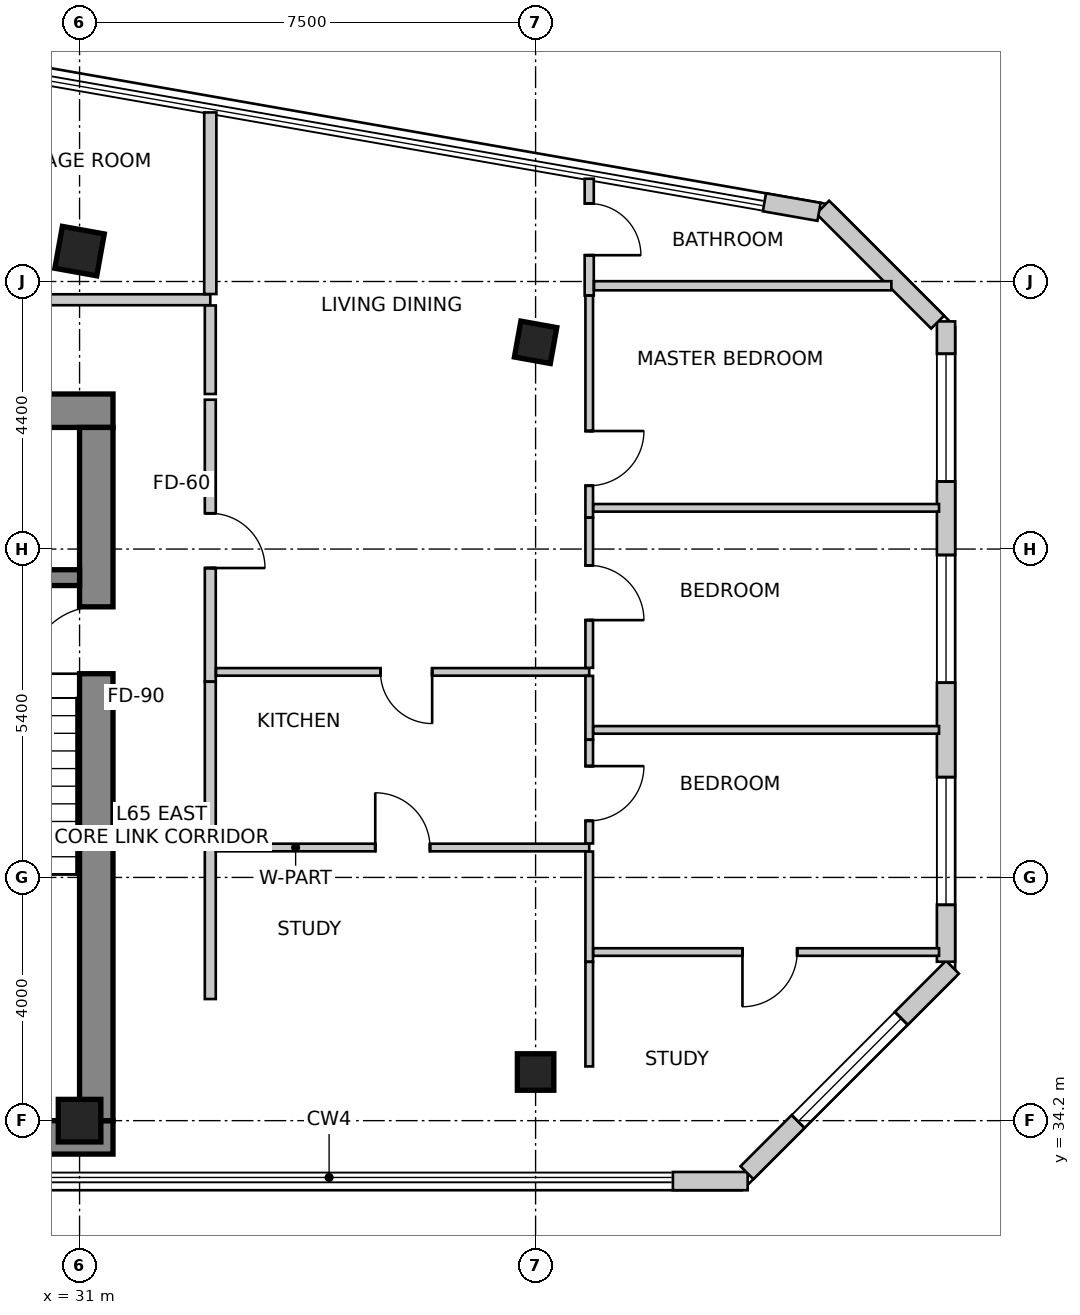
"""IFC4 building model, lengths in metres.
Left out: names, types, materials, properties, quantities, classifications, styles, units other than length and angle.
Written with IfcOpenShell. Run it as: python <this file> out.ifc"""

import sys

from ifc_helpers import new_model, si_unit, direction, frame, frame_2d, origin, origin_2d, place, context, subcontext, project, spatial, rectangle, extrude, source, transform, mapped, element, fill, save


model = new_model("IFC4")
c1 = context("Model", 3, precision=1e-05, world=origin(), true_north=direction((0.0, 1.0)))
c2 = subcontext(c1, "Body", "Model", "MODEL_VIEW")
j1 = project(units=[si_unit("LENGTHUNIT", "METRE"), si_unit("PLANEANGLEUNIT", "RADIAN")], contexts=[c1])
p1 = place(None, origin())
s1 = spatial("IfcSite", under=j1, at=p1, CompositionType="ELEMENT")
p2 = place(p1, origin())
s2 = spatial("IfcBuilding", under=s1, at=p2, CompositionType="ELEMENT")
p3 = place(p2, frame((0.0, 0.0, 256.5)))
s3 = spatial("IfcBuildingStorey", under=s2, at=p3, CompositionType="ELEMENT", Elevation=256.5)
p4 = place(p3, frame((16.05, 45.875, 0.0), z_axis=(0.0, 0.0, 1.0), x_axis=(1.0, 0.0, 0.0)))
e1 = element("IfcWall", 1, at=p4, inside=s3, PredefinedType="SHEAR", context=c2, shape_type="SweptSolid", body=[
    extrude(rectangle(XDim=15.5, YDim=0.55, at=frame_2d((7.75, 0.0))), origin(), (0.0, 0.0, 1.0), 3.6),
])
p5 = place(p3, frame((16.05, 33.925, 0.0), z_axis=(0.0, 0.0, 1.0), x_axis=(1.0, 0.0, 0.0)))
e2 = element("IfcWall", 2, at=p5, inside=s3, PredefinedType="SHEAR", context=c2, shape_type="SweptSolid", body=[
    extrude(rectangle(XDim=15.5, YDim=0.55, at=frame_2d((7.75, 0.0))), origin(), (0.0, 0.0, 1.0), 3.6),
])
m1 = source(origin(), c2, "Body", "SweptSolid", [
    extrude(rectangle(XDim=1.1, YDim=2.15, at=frame_2d((0.55, 1.075))), frame((0.0, 0.285, 0.0), z_axis=(0.0, -1.0, 0.0), x_axis=(1.0, 0.0, 0.0)), (0.0, 0.0, 1.0), 0.57),
])
p6 = place(p5, frame((9.98, 0.0, 0.0)))
e3 = element("IfcOpeningElement", 3, at=p6, cuts=e2, PredefinedType="OPENING", context=c2, shape_type="MappedRepresentation", body=[
    mapped(m1, transform((0.0, 0.0, 0.0), scale=1.0)),
])
p7 = place(p3, frame((31.275, 34.2, 0.0), z_axis=(0.0, 0.0, 1.0), x_axis=(0.0, 1.0, 0.0)))
e4 = element("IfcWall", 4, at=p7, inside=s3, PredefinedType="SHEAR", context=c2, shape_type="SweptSolid", body=[
    extrude(rectangle(XDim=11.4, YDim=0.55, at=frame_2d((5.7, 0.0))), origin(), (0.0, 0.0, 1.0), 3.6),
])
p8 = place(p7, frame((7.35, 0.0, 0.0)))
e5 = element("IfcOpeningElement", 5, at=p8, cuts=e4, PredefinedType="OPENING", context=c2, shape_type="MappedRepresentation", body=[
    mapped(m1, transform((0.0, 0.0, 0.0), scale=1.0)),
])
p9 = place(p3, frame((27.5, 43.13, 0.0), z_axis=(0.0, 0.0, 1.0), x_axis=(1.0, 0.0, 0.0)))
e6 = element("IfcWall", 6, at=p9, inside=s3, PredefinedType="SHEAR", context=c2, shape_type="SweptSolid", body=[
    extrude(rectangle(XDim=3.5, YDim=0.26, at=frame_2d((1.75, 0.0))), origin(), (0.0, 0.0, 1.0), 3.6),
])
m2 = source(origin(), c2, "Body", "SweptSolid", [
    extrude(rectangle(XDim=0.7, YDim=0.7, at=origin_2d()), origin(), (0.0, 0.0, 1.0), 3.6),
])
p10 = place(p3, frame((31.0, 48.5, 0.0), z_axis=(0.0, 0.0, 1.0), x_axis=(0.984195607969, -0.17708474032, 0.0)))
e7 = element("IfcColumn", 7, at=p10, inside=s3, PredefinedType="COLUMN", context=c2, shape_type="MappedRepresentation", body=[
    mapped(m2, transform((0.0, 0.0, 0.0), scale=1.0)),
])
m3 = source(origin(), c2, "Body", "SweptSolid", [
    extrude(rectangle(XDim=0.6, YDim=0.6, at=origin_2d()), origin(), (0.0, 0.0, 1.0), 3.6),
])
p11 = place(p3, frame((38.5, 47.0, 0.0), z_axis=(0.0, 0.0, 1.0), x_axis=(0.984195607969, -0.17708474032, 0.0)))
e8 = element("IfcColumn", 8, at=p11, inside=s3, PredefinedType="COLUMN", context=c2, shape_type="MappedRepresentation", body=[
    mapped(m3, transform((0.0, 0.0, 0.0), scale=1.0)),
])
p12 = place(p3, frame((31.0, 34.2, 0.0), z_axis=(0.0, 0.0, 1.0), x_axis=(1.0, 0.0, 0.0)))
e9 = element("IfcColumn", 9, at=p12, inside=s3, PredefinedType="COLUMN", context=c2, shape_type="MappedRepresentation", body=[
    mapped(m2, transform((0.0, 0.0, 0.0), scale=1.0)),
])
p13 = place(p3, frame((38.5, 35.0, 0.0), z_axis=(0.0, 0.0, 1.0), x_axis=(1.0, 0.0, 0.0)))
e10 = element("IfcColumn", 10, at=p13, inside=s3, PredefinedType="COLUMN", context=c2, shape_type="MappedRepresentation", body=[
    mapped(m3, transform((0.0, 0.0, 0.0), scale=1.0)),
])
p14 = place(p3, frame((40.758, 33.206, 0.0), z_axis=(0.0, 0.0, 1.0), x_axis=(1.0, 0.0, 0.0)))
e11 = element("IfcWall", 11, at=p14, inside=s3, PredefinedType="SOLIDWALL", context=c2, shape_type="SweptSolid", body=[
    extrude(rectangle(XDim=1.23, YDim=0.3, at=frame_2d((0.615, 0.0))), origin(), (0.0, 0.0, 1.0), 3.35),
])
p15 = place(p3, frame((41.976, 33.344, 0.0), z_axis=(0.0, 0.0, 1.0), x_axis=(0.707132316343, 0.707081245108, 0.0)))
e12 = element("IfcWall", 12, at=p15, inside=s3, PredefinedType="SOLIDWALL", context=c2, shape_type="SweptSolid", body=[
    extrude(rectangle(XDim=4.78, YDim=0.3, at=frame_2d((2.39, 0.0))), origin(), (0.0, 0.0, 1.0), 3.35),
])
m4 = source(origin(), c2, "Body", "SweptSolid", [
    extrude(rectangle(XDim=2.4, YDim=2.2, at=frame_2d((1.2, 1.1))), frame((0.0, 0.16, 0.0), z_axis=(0.0, -1.0, 0.0), x_axis=(1.0, 0.0, 0.0)), (0.0, 0.0, 1.0), 0.32),
])
p16 = place(p15, frame((1.19, 0.0, 0.85)))
e13 = element("IfcOpeningElement", 13, at=p16, cuts=e12, PredefinedType="OPENING", context=c2, shape_type="MappedRepresentation", body=[
    mapped(m4, transform((0.0, 0.0, 0.0), scale=1.0)),
])
p17 = place(p3, frame((45.25, 36.813, 0.0), z_axis=(0.0, 0.0, 1.0), x_axis=(0.0, 1.0, 0.0)))
e14 = element("IfcWall", 14, at=p17, inside=s3, PredefinedType="SOLIDWALL", context=c2, shape_type="SweptSolid", body=[
    extrude(rectangle(XDim=10.531, YDim=0.3, at=frame_2d((5.265, 0.0))), origin(), (0.0, 0.0, 1.0), 3.35),
])
m5 = source(origin(), c2, "Body", "SweptSolid", [
    extrude(rectangle(XDim=2.1, YDim=2.0, at=frame_2d((1.05, 1.0))), frame((0.0, 0.16, 0.0), z_axis=(0.0, -1.0, 0.0), x_axis=(1.0, 0.0, 0.0)), (0.0, 0.0, 1.0), 0.32),
])
p18 = place(p17, frame((0.936, 0.0, 0.85)))
e15 = element("IfcOpeningElement", 15, at=p18, cuts=e14, PredefinedType="OPENING", context=c2, shape_type="MappedRepresentation", body=[
    mapped(m5, transform((0.0, 0.0, 0.0), scale=1.0)),
])
p19 = place(p17, frame((4.589, 0.0, 0.85)))
e16 = element("IfcOpeningElement", 16, at=p19, cuts=e14, PredefinedType="OPENING", context=c2, shape_type="MappedRepresentation", body=[
    mapped(m5, transform((0.0, 0.0, 0.0), scale=1.0)),
])
p20 = place(p17, frame((7.898, 0.0, 0.85)))
e17 = element("IfcOpeningElement", 17, at=p20, cuts=e14, PredefinedType="OPENING", context=c2, shape_type="MappedRepresentation", body=[
    mapped(m5, transform((0.0, 0.0, 0.0), scale=1.0)),
])
p21 = place(p3, frame((45.112, 47.332, 0.0), z_axis=(0.0, 0.0, 1.0), x_axis=(-0.707106781187, 0.707106781187, 0.0)))
e18 = element("IfcWall", 18, at=p21, inside=s3, PredefinedType="SOLIDWALL", context=c2, shape_type="SweptSolid", body=[
    extrude(rectangle(XDim=2.674, YDim=0.3, at=frame_2d((1.337, 0.0))), origin(), (0.0, 0.0, 1.0), 3.35),
])
p22 = place(p3, frame((43.161, 49.146, 0.0), z_axis=(0.0, 0.0, 1.0), x_axis=(-0.985052066521, 0.172256861238, 0.0)))
e19 = element("IfcWall", 19, at=p22, inside=s3, PredefinedType="SOLIDWALL", context=c2, shape_type="SweptSolid", body=[
    extrude(rectangle(XDim=0.911, YDim=0.3, at=frame_2d((0.456, 0.0))), origin(), (0.0, 0.0, 1.0), 3.35),
])
p23 = place(p3, frame((28.362, 47.7, 0.0), z_axis=(0.0, 0.0, 1.0), x_axis=(1.0, 0.0, 0.0)))
e20 = element("IfcWall", 20, at=p23, inside=s3, PredefinedType="PARTITIONING", context=c2, shape_type="SweptSolid", body=[
    extrude(rectangle(XDim=4.788, YDim=0.18, at=frame_2d((2.394, 0.0))), origin(), (0.0, 0.0, 1.0), 2.922),
])
m6 = source(origin(), c2, "Body", "SweptSolid", [
    extrude(rectangle(XDim=0.85, YDim=2.15, at=frame_2d((0.425, 1.075))), frame((0.0, 0.1, 0.0), z_axis=(0.0, -1.0, 0.0), x_axis=(1.0, 0.0, 0.0)), (0.0, 0.0, 1.0), 0.2),
])
p24 = place(p23, frame((0.401, 0.0, 0.0)))
e21 = element("IfcOpeningElement", 21, at=p24, cuts=e20, PredefinedType="OPENING", context=c2, shape_type="MappedRepresentation", body=[
    mapped(m6, transform((0.0, 0.0, 0.0), scale=1.0)),
])
p25 = place(p3, frame((33.15, 47.606, 0.0), z_axis=(0.0, 0.0, 1.0), x_axis=(0.0, -1.0, 0.0)))
e22 = element("IfcWall", 22, at=p25, inside=s3, PredefinedType="PARTITIONING", context=c2, shape_type="SweptSolid", body=[
    extrude(rectangle(XDim=1.456, YDim=0.18, at=frame_2d((0.728, 0.0))), origin(), (0.0, 0.0, 1.0), 3.35),
])
p26 = place(p3, frame((33.15, 38.852, 0.0), z_axis=(0.0, 0.0, 1.0), x_axis=(0.0, -1.0, 0.0)))
e23 = element("IfcWall", 23, at=p26, inside=s3, PredefinedType="PARTITIONING", context=c2, shape_type="SweptSolid", body=[
    extrude(rectangle(XDim=2.652, YDim=0.18, at=frame_2d((1.326, 0.0))), origin(), (0.0, 0.0, 1.0), 3.35),
])
p27 = place(p3, frame((33.15, 46.056, 0.0), z_axis=(0.0, 0.0, 1.0), x_axis=(0.0, -1.0, 0.0)))
e24 = element("IfcWall", 24, at=p27, inside=s3, PredefinedType="PARTITIONING", context=c2, shape_type="SweptSolid", body=[
    extrude(rectangle(XDim=4.636, YDim=0.18, at=frame_2d((2.318, 0.0))), origin(), (0.0, 0.0, 1.0), 2.922),
])
m7 = source(origin(), c2, "Body", "SweptSolid", [
    extrude(rectangle(XDim=0.9, YDim=2.15, at=frame_2d((0.45, 1.075))), frame((0.0, 0.1, 0.0), z_axis=(0.0, -1.0, 0.0), x_axis=(1.0, 0.0, 0.0)), (0.0, 0.0, 1.0), 0.2),
])
p28 = place(p27, frame((1.868, 0.0, 0.0)))
e25 = element("IfcOpeningElement", 25, at=p28, cuts=e24, PredefinedType="OPENING", context=c2, shape_type="MappedRepresentation", body=[
    mapped(m7, transform((0.0, 0.0, 0.0), scale=1.0)),
])
p29 = place(p3, frame((33.15, 41.418, 0.0), z_axis=(0.0, 0.0, 1.0), x_axis=(0.0, -1.0, 0.0)))
e26 = element("IfcWall", 26, at=p29, inside=s3, PredefinedType="PARTITIONING", context=c2, shape_type="SweptSolid", body=[
    extrude(rectangle(XDim=2.564, YDim=0.18, at=frame_2d((1.282, 0.0))), origin(), (0.0, 0.0, 1.0), 3.35),
])
p30 = place(p3, frame((33.15, 50.78, 0.0), z_axis=(0.0, 0.0, 1.0), x_axis=(0.0, -1.0, 0.0)))
e27 = element("IfcWall", 27, at=p30, inside=s3, PredefinedType="PARTITIONING", context=c2, shape_type="SweptSolid", body=[
    extrude(rectangle(XDim=2.986, YDim=0.2, at=frame_2d((1.493, 0.0))), origin(), (0.0, 0.0, 1.0), 2.642),
])
p31 = place(p3, frame((33.244, 38.692, 0.0), z_axis=(0.0, 0.0, 1.0), x_axis=(1.0, 0.0, 0.0)))
e28 = element("IfcWall", 28, at=p31, inside=s3, PredefinedType="PARTITIONING", context=c2, shape_type="SweptSolid", body=[
    extrude(rectangle(XDim=6.138, YDim=0.125, at=frame_2d((3.069, 0.0))), origin(), (0.0, 0.0, 1.0), 2.979),
])
m8 = source(origin(), c2, "Body", "SweptSolid", [
    extrude(rectangle(XDim=0.9, YDim=2.15, at=frame_2d((0.45, 1.075))), frame((0.0, 0.073, 0.0), z_axis=(0.0, -1.0, 0.0), x_axis=(1.0, 0.0, 0.0)), (0.0, 0.0, 1.0), 0.145),
])
p32 = place(p31, frame((2.619, 0.0, 0.0)))
e29 = element("IfcOpeningElement", 29, at=p32, cuts=e28, PredefinedType="OPENING", context=c2, shape_type="MappedRepresentation", body=[
    mapped(m8, transform((0.0, 0.0, 0.0), scale=1.0)),
])
p33 = place(p3, frame((39.382, 38.625, 0.0), z_axis=(0.0, 0.0, 1.0), x_axis=(0.0, -1.0, 0.0)))
e30 = element("IfcWall", 30, at=p33, inside=s3, PredefinedType="PARTITIONING", context=c2, shape_type="SweptSolid", body=[
    extrude(rectangle(XDim=1.812, YDim=0.125, at=frame_2d((0.906, 0.0))), origin(), (0.0, 0.0, 1.0), 3.35),
])
p34 = place(p3, frame((39.382, 36.811, 0.0), z_axis=(0.0, 0.0, 1.0), x_axis=(0.0, -1.0, 0.0)))
e31 = element("IfcWall", 31, at=p34, inside=s3, PredefinedType="PARTITIONING", context=c2, shape_type="SweptSolid", body=[
    extrude(rectangle(XDim=1.719, YDim=0.125, at=frame_2d((0.859, 0.0))), origin(), (0.0, 0.0, 1.0), 3.35),
])
p35 = place(p3, frame((39.382, 41.58, 0.0), z_axis=(0.0, 0.0, 1.0), x_axis=(-1.0, 0.0, 0.0)))
e32 = element("IfcWall", 32, at=p35, inside=s3, PredefinedType="PARTITIONING", context=c2, shape_type="SweptSolid", body=[
    extrude(rectangle(XDim=6.138, YDim=0.125, at=frame_2d((3.069, 0.0))), origin(), (0.0, 0.0, 1.0), 2.979),
])
m9 = source(origin(), c2, "Body", "SweptSolid", [
    extrude(rectangle(XDim=0.85, YDim=2.15, at=frame_2d((0.425, 1.075))), frame((0.0, 0.073, 0.0), z_axis=(0.0, -1.0, 0.0), x_axis=(1.0, 0.0, 0.0)), (0.0, 0.0, 1.0), 0.145),
])
p36 = place(p35, frame((2.583, 0.0, 0.0)))
e33 = element("IfcOpeningElement", 33, at=p36, cuts=e32, PredefinedType="OPENING", context=c2, shape_type="MappedRepresentation", body=[
    mapped(m9, transform((0.0, 0.0, 0.0), scale=1.0)),
])
p37 = place(p3, frame((39.382, 49.69, 0.0), z_axis=(0.0, 0.0, 1.0), x_axis=(0.0, -1.0, 0.0)))
e34 = element("IfcWall", 34, at=p37, inside=s3, PredefinedType="PARTITIONING", context=c2, shape_type="SweptSolid", body=[
    extrude(rectangle(XDim=1.92, YDim=0.15, at=frame_2d((0.96, 0.0))), origin(), (0.0, 0.0, 1.0), 3.35),
])
m10 = source(origin(), c2, "Body", "SweptSolid", [
    extrude(rectangle(XDim=0.85, YDim=2.15, at=frame_2d((0.425, 1.075))), frame((0.0, 0.085, 0.0), z_axis=(0.0, -1.0, 0.0), x_axis=(1.0, 0.0, 0.0)), (0.0, 0.0, 1.0), 0.17),
])
p38 = place(p37, frame((0.407, 0.0, 0.0)))
e35 = element("IfcOpeningElement", 35, at=p38, cuts=e34, PredefinedType="OPENING", context=c2, shape_type="MappedRepresentation", body=[
    mapped(m10, transform((0.0, 0.0, 0.0), scale=1.0)),
])
p39 = place(p3, frame((39.382, 47.768, 0.0), z_axis=(0.0, 0.0, 1.0), x_axis=(0.0, -1.0, 0.0)))
e36 = element("IfcWall", 36, at=p39, inside=s3, PredefinedType="PARTITIONING", context=c2, shape_type="SweptSolid", body=[
    extrude(rectangle(XDim=3.65, YDim=0.125, at=frame_2d((1.825, 0.0))), origin(), (0.0, 0.0, 1.0), 3.35),
])
p40 = place(p39, frame((2.227, 0.0, 0.0)))
e37 = element("IfcOpeningElement", 37, at=p40, cuts=e36, PredefinedType="OPENING", context=c2, shape_type="MappedRepresentation", body=[
    mapped(m8, transform((0.0, 0.0, 0.0), scale=1.0)),
])
p41 = place(p3, frame((39.382, 44.116, 0.0), z_axis=(0.0, 0.0, 1.0), x_axis=(0.0, -1.0, 0.0)))
e38 = element("IfcWall", 38, at=p41, inside=s3, PredefinedType="PARTITIONING", context=c2, shape_type="SweptSolid", body=[
    extrude(rectangle(XDim=2.469, YDim=0.125, at=frame_2d((1.235, 0.0))), origin(), (0.0, 0.0, 1.0), 3.35),
])
p42 = place(p41, frame((0.785, 0.0, 0.0)))
e39 = element("IfcOpeningElement", 39, at=p42, cuts=e38, PredefinedType="OPENING", context=c2, shape_type="MappedRepresentation", body=[
    mapped(m8, transform((0.0, 0.0, 0.0), scale=1.0)),
])
p43 = place(p3, frame((39.382, 41.513, 0.0), z_axis=(0.0, 0.0, 1.0), x_axis=(0.0, -1.0, 0.0)))
e40 = element("IfcWall", 40, at=p43, inside=s3, PredefinedType="PARTITIONING", context=c2, shape_type="SweptSolid", body=[
    extrude(rectangle(XDim=1.047, YDim=0.125, at=frame_2d((0.524, 0.0))), origin(), (0.0, 0.0, 1.0), 3.35),
])
p44 = place(p3, frame((39.382, 40.464, 0.0), z_axis=(0.0, 0.0, 1.0), x_axis=(0.0, -1.0, 0.0)))
e41 = element("IfcWall", 41, at=p44, inside=s3, PredefinedType="PARTITIONING", context=c2, shape_type="SweptSolid", body=[
    extrude(rectangle(XDim=1.706, YDim=0.125, at=frame_2d((0.853, 0.0))), origin(), (0.0, 0.0, 1.0), 3.35),
])
p45 = place(p44, frame((0.433, 0.0, 0.0)))
e42 = element("IfcOpeningElement", 42, at=p45, cuts=e41, PredefinedType="OPENING", context=c2, shape_type="MappedRepresentation", body=[
    mapped(m8, transform((0.0, 0.0, 0.0), scale=1.0)),
])
p46 = place(p3, frame((44.351, 47.93, 0.0), z_axis=(0.0, 0.0, 1.0), x_axis=(-1.0, 0.0, 0.0)))
e43 = element("IfcWall", 43, at=p46, inside=s3, PredefinedType="PARTITIONING", context=c2, shape_type="SweptSolid", body=[
    extrude(rectangle(XDim=4.89, YDim=0.15, at=frame_2d((2.445, 0.0))), origin(), (0.0, 0.0, 1.0), 3.35),
])
for number, where, z_axis, x_axis in (
    (44, (45.135, 44.278, 0.0), (0.0, 0.0, 1.0), (-1.0, 0.0, 0.0)),
    (45, (45.135, 40.626, 0.0), (0.0, 0.0, 1.0), (-1.0, 0.0, 0.0)),
):
    element("IfcWall", number, at=place(p3, frame(where, z_axis=z_axis, x_axis=x_axis)), inside=s3, PredefinedType="PARTITIONING", context=c2, shape_type="SweptSolid", body=[
        extrude(rectangle(XDim=5.687, YDim=0.125, at=frame_2d((2.843, 0.0))), origin(), (0.0, 0.0, 1.0), 3.35),
    ])
p47 = place(p3, frame((45.135, 36.973, 0.0), z_axis=(0.0, 0.0, 1.0), x_axis=(-1.0, 0.0, 0.0)))
e46 = element("IfcWall", 46, at=p47, inside=s3, PredefinedType="PARTITIONING", context=c2, shape_type="SweptSolid", body=[
    extrude(rectangle(XDim=5.687, YDim=0.125, at=frame_2d((2.843, 0.0))), origin(), (0.0, 0.0, 1.0), 3.35),
])
p48 = place(p47, frame((2.333, 0.0, 0.0)))
e47 = element("IfcOpeningElement", 47, at=p48, cuts=e46, PredefinedType="OPENING", context=c2, shape_type="MappedRepresentation", body=[
    mapped(m8, transform((0.0, 0.0, 0.0), scale=1.0)),
])
m11 = source(origin(), c2, "Body", "SweptSolid", [
    extrude(rectangle(XDim=2.4, YDim=2.2, at=frame_2d((1.2, 1.1))), frame((0.0, -0.015, 0.0), z_axis=(0.0, -1.0, 0.0), x_axis=(1.0, 0.0, 0.0)), (0.0, 0.0, 1.0), 0.06),
])
p49 = place(p16, origin())
e48 = element("IfcWindow", 48, at=p49, inside=s3, PartitioningType="SINGLE_PANEL", PredefinedType="WINDOW", context=c2, shape_type="MappedRepresentation", body=[
    mapped(m11, transform((0.0, 0.0, 0.0), scale=1.0)),
])
fill(e13, e48)
m12 = source(origin(), c2, "Body", "SweptSolid", [
    extrude(rectangle(XDim=2.1, YDim=2.0, at=frame_2d((1.05, 1.0))), frame((0.0, -0.015, 0.0), z_axis=(0.0, -1.0, 0.0), x_axis=(1.0, 0.0, 0.0)), (0.0, 0.0, 1.0), 0.06),
])
p50 = place(p18, origin())
e49 = element("IfcWindow", 49, at=p50, inside=s3, PartitioningType="SINGLE_PANEL", PredefinedType="WINDOW", context=c2, shape_type="MappedRepresentation", body=[
    mapped(m12, transform((0.0, 0.0, 0.0), scale=1.0)),
])
fill(e15, e49)
p51 = place(p19, origin())
e50 = element("IfcWindow", 50, at=p51, inside=s3, PartitioningType="SINGLE_PANEL", PredefinedType="WINDOW", context=c2, shape_type="MappedRepresentation", body=[
    mapped(m12, transform((0.0, 0.0, 0.0), scale=1.0)),
])
fill(e16, e50)
p52 = place(p20, origin())
e51 = element("IfcWindow", 51, at=p52, inside=s3, PartitioningType="SINGLE_PANEL", PredefinedType="WINDOW", context=c2, shape_type="MappedRepresentation", body=[
    mapped(m12, transform((0.0, 0.0, 0.0), scale=1.0)),
])
fill(e17, e51)
m13 = source(origin(), c2, "Body", "SweptSolid", [
    extrude(rectangle(XDim=1.1, YDim=2.15, at=frame_2d((0.55, 1.075))), frame((0.0, 0.025, 0.0), z_axis=(0.0, -1.0, 0.0), x_axis=(1.0, 0.0, 0.0)), (0.0, 0.0, 1.0), 0.05),
])
p53 = place(p8, origin())
e52 = element("IfcDoor", 52, at=p53, inside=s3, OperationType="SINGLE_SWING_LEFT", PredefinedType="DOOR", context=c2, shape_type="MappedRepresentation", body=[
    mapped(m13, transform((0.0, 0.0, 0.0), scale=1.0)),
])
fill(e5, e52)
m14 = source(origin(), c2, "Body", "SweptSolid", [
    extrude(rectangle(XDim=0.9, YDim=2.15, at=frame_2d((0.45, 1.075))), frame((0.0, 0.025, 0.0), z_axis=(0.0, -1.0, 0.0), x_axis=(1.0, 0.0, 0.0)), (0.0, 0.0, 1.0), 0.05),
])
p54 = place(p32, origin())
e53 = element("IfcDoor", 53, at=p54, inside=s3, OperationType="SINGLE_SWING_LEFT", PredefinedType="DOOR", context=c2, shape_type="MappedRepresentation", body=[
    mapped(m14, transform((0.0, 0.0, 0.0), scale=1.0)),
])
fill(e29, e53)
m15 = source(origin(), c2, "Body", "SweptSolid", [
    extrude(rectangle(XDim=0.9, YDim=2.15, at=frame_2d((0.45, 1.075))), frame((0.0, 0.025, 0.0), z_axis=(0.0, -1.0, 0.0), x_axis=(1.0, 0.0, 0.0)), (0.0, 0.0, 1.0), 0.05),
])
p55 = place(p28, origin())
e54 = element("IfcDoor", 54, at=p55, inside=s3, OperationType="SINGLE_SWING_RIGHT", PredefinedType="DOOR", context=c2, shape_type="MappedRepresentation", body=[
    mapped(m15, transform((0.0, 0.0, 0.0), scale=1.0)),
])
fill(e25, e54)
m16 = source(origin(), c2, "Body", "SweptSolid", [
    extrude(rectangle(XDim=0.85, YDim=2.15, at=frame_2d((0.425, 1.075))), frame((0.0, 0.025, 0.0), z_axis=(0.0, -1.0, 0.0), x_axis=(1.0, 0.0, 0.0)), (0.0, 0.0, 1.0), 0.05),
])
p56 = place(p36, origin())
e55 = element("IfcDoor", 55, at=p56, inside=s3, OperationType="SINGLE_SWING_LEFT", PredefinedType="DOOR", context=c2, shape_type="MappedRepresentation", body=[
    mapped(m16, transform((0.0, 0.0, 0.0), scale=1.0)),
])
fill(e33, e55)
p57 = place(p38, origin())
e56 = element("IfcDoor", 56, at=p57, inside=s3, OperationType="SINGLE_SWING_RIGHT", PredefinedType="DOOR", context=c2, shape_type="MappedRepresentation", body=[
    mapped(m16, transform((0.0, 0.0, 0.0), scale=1.0)),
])
fill(e35, e56)
p58 = place(p40, origin())
e57 = element("IfcDoor", 57, at=p58, inside=s3, OperationType="SINGLE_SWING_LEFT", PredefinedType="DOOR", context=c2, shape_type="MappedRepresentation", body=[
    mapped(m14, transform((0.0, 0.0, 0.0), scale=1.0)),
])
fill(e37, e57)
p59 = place(p42, origin())
e58 = element("IfcDoor", 58, at=p59, inside=s3, OperationType="SINGLE_SWING_RIGHT", PredefinedType="DOOR", context=c2, shape_type="MappedRepresentation", body=[
    mapped(m14, transform((0.0, 0.0, 0.0), scale=1.0)),
])
fill(e39, e58)
p60 = place(p45, origin())
e59 = element("IfcDoor", 59, at=p60, inside=s3, OperationType="SINGLE_SWING_LEFT", PredefinedType="DOOR", context=c2, shape_type="MappedRepresentation", body=[
    mapped(m14, transform((0.0, 0.0, 0.0), scale=1.0)),
])
fill(e42, e59)
p61 = place(p48, origin())
e60 = element("IfcDoor", 60, at=p61, inside=s3, OperationType="SINGLE_SWING_RIGHT", PredefinedType="DOOR", context=c2, shape_type="MappedRepresentation", body=[
    mapped(m14, transform((0.0, 0.0, 0.0), scale=1.0)),
])
fill(e47, e60)
save(model, sys.argv[1])
